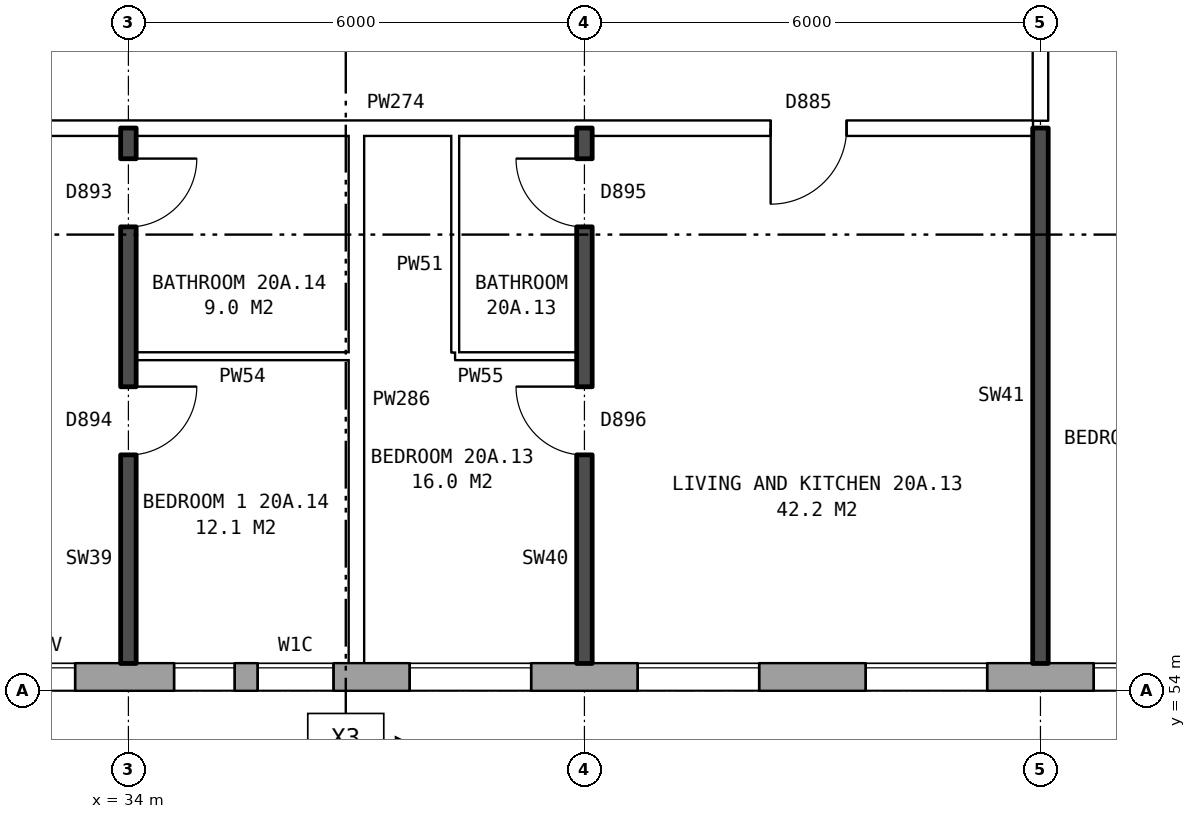
"""IFC4 building model, lengths in metres.
Left out: names, types, materials, properties, quantities, classifications, styles, units other than length and angle.
Written with IfcOpenShell. Run it as: python <this file> out.ifc"""

import sys

from ifc_helpers import new_model, si_unit, direction, frame, frame_2d, origin, place, context, subcontext, project, spatial, rectangle, extrude, element, fill, save


model = new_model("IFC4")
c1 = context("Model", 3, precision=1e-05, world=origin(), true_north=direction((0.0, 1.0)))
c2 = subcontext(c1, "Body", "Model", "MODEL_VIEW")
j1 = project(units=[si_unit("LENGTHUNIT", "METRE"), si_unit("PLANEANGLEUNIT", "RADIAN")], contexts=[c1])
p1 = place(None, origin())
s1 = spatial("IfcSite", under=j1, at=p1, CompositionType="ELEMENT")
p2 = place(p1, origin())
s2 = spatial("IfcBuilding", under=s1, at=p2, CompositionType="ELEMENT")
p3 = place(p2, frame((0.0, 0.0, 74.7)))
s3 = spatial("IfcBuildingStorey", under=s2, at=p3, CompositionType="ELEMENT", Elevation=74.7)
p4 = place(p3, frame((26.325, 54.18, 0.0), z_axis=(0.0, 0.0, 1.0), x_axis=(1.0, 0.0, 0.0)))
e1 = element("IfcWall", 1, at=p4, inside=s3, PredefinedType="STANDARD", context=c2, shape_type="SweptSolid", body=[
    extrude(rectangle(XDim=46.601, YDim=0.36, at=frame_2d((23.3, 0.0))), origin(), (0.0, 0.0, 1.0), 2.85),
])
p5 = place(p4, frame((2.375, 0.0, 0.8)))
e2 = element("IfcOpeningElement", 2, at=p5, cuts=e1, PredefinedType="OPENING", context=c2, shape_type="SweptSolid", body=[
    extrude(rectangle(XDim=1.6, YDim=1.8, at=frame_2d((0.8, 0.9))), frame((0.0, 0.19, 0.0), z_axis=(0.0, -1.0, 0.0), x_axis=(1.0, 0.0, 0.0)), (0.0, 0.0, 1.0), 0.38),
])
p6 = place(p4, frame((4.275, 0.0, 0.8)))
e3 = element("IfcOpeningElement", 3, at=p6, cuts=e1, PredefinedType="OPENING", context=c2, shape_type="SweptSolid", body=[
    extrude(rectangle(XDim=1.6, YDim=1.8, at=frame_2d((0.8, 0.9))), frame((0.0, 0.19, 0.0), z_axis=(0.0, -1.0, 0.0), x_axis=(1.0, 0.0, 0.0)), (0.0, 0.0, 1.0), 0.38),
])
p7 = place(p4, frame((8.275, 0.0, 0.8)))
e4 = element("IfcOpeningElement", 4, at=p7, cuts=e1, PredefinedType="OPENING", context=c2, shape_type="SweptSolid", body=[
    extrude(rectangle(XDim=0.8, YDim=0.9, at=frame_2d((0.4, 0.45))), frame((0.0, 0.19, 0.0), z_axis=(0.0, -1.0, 0.0), x_axis=(1.0, 0.0, 0.0)), (0.0, 0.0, 1.0), 0.38),
])
p8 = place(p4, frame((11.375, 0.0, 0.8)))
e5 = element("IfcOpeningElement", 5, at=p8, cuts=e1, PredefinedType="OPENING", context=c2, shape_type="SweptSolid", body=[
    extrude(rectangle(XDim=1.6, YDim=1.8, at=frame_2d((0.8, 0.9))), frame((0.0, 0.19, 0.0), z_axis=(0.0, -1.0, 0.0), x_axis=(1.0, 0.0, 0.0)), (0.0, 0.0, 1.0), 0.38),
])
p9 = place(p4, frame((14.375, 0.0, 0.8)))
e6 = element("IfcOpeningElement", 6, at=p9, cuts=e1, PredefinedType="OPENING", context=c2, shape_type="SweptSolid", body=[
    extrude(rectangle(XDim=1.6, YDim=1.8, at=frame_2d((0.8, 0.9))), frame((0.0, 0.19, 0.0), z_axis=(0.0, -1.0, 0.0), x_axis=(1.0, 0.0, 0.0)), (0.0, 0.0, 1.0), 0.38),
])
p10 = place(p4, frame((17.375, 0.0, 0.8)))
e7 = element("IfcOpeningElement", 7, at=p10, cuts=e1, PredefinedType="OPENING", context=c2, shape_type="SweptSolid", body=[
    extrude(rectangle(XDim=1.6, YDim=1.8, at=frame_2d((0.8, 0.9))), frame((0.0, 0.19, 0.0), z_axis=(0.0, -1.0, 0.0), x_axis=(1.0, 0.0, 0.0)), (0.0, 0.0, 1.0), 0.38),
])
p11 = place(p4, frame((20.375, 0.0, 0.8)))
e8 = element("IfcOpeningElement", 8, at=p11, cuts=e1, PredefinedType="OPENING", context=c2, shape_type="SweptSolid", body=[
    extrude(rectangle(XDim=1.6, YDim=1.8, at=frame_2d((0.8, 0.9))), frame((0.0, 0.19, 0.0), z_axis=(0.0, -1.0, 0.0), x_axis=(1.0, 0.0, 0.0)), (0.0, 0.0, 1.0), 0.38),
])
p12 = place(p4, frame((23.375, 0.0, 0.8)))
e9 = element("IfcOpeningElement", 9, at=p12, cuts=e1, PredefinedType="OPENING", context=c2, shape_type="SweptSolid", body=[
    extrude(rectangle(XDim=1.6, YDim=1.8, at=frame_2d((0.8, 0.9))), frame((0.0, 0.19, 0.0), z_axis=(0.0, -1.0, 0.0), x_axis=(1.0, 0.0, 0.0)), (0.0, 0.0, 1.0), 0.38),
])
p13 = place(p4, frame((26.375, 0.0, 0.8)))
e10 = element("IfcOpeningElement", 10, at=p13, cuts=e1, PredefinedType="OPENING", context=c2, shape_type="SweptSolid", body=[
    extrude(rectangle(XDim=1.6, YDim=1.8, at=frame_2d((0.8, 0.9))), frame((0.0, 0.19, 0.0), z_axis=(0.0, -1.0, 0.0), x_axis=(1.0, 0.0, 0.0)), (0.0, 0.0, 1.0), 0.38),
])
p14 = place(p4, frame((29.375, 0.0, 0.8)))
e11 = element("IfcOpeningElement", 11, at=p14, cuts=e1, PredefinedType="OPENING", context=c2, shape_type="SweptSolid", body=[
    extrude(rectangle(XDim=1.6, YDim=1.8, at=frame_2d((0.8, 0.9))), frame((0.0, 0.19, 0.0), z_axis=(0.0, -1.0, 0.0), x_axis=(1.0, 0.0, 0.0)), (0.0, 0.0, 1.0), 0.38),
])
p15 = place(p4, frame((32.375, 0.0, 0.8)))
e12 = element("IfcOpeningElement", 12, at=p15, cuts=e1, PredefinedType="OPENING", context=c2, shape_type="SweptSolid", body=[
    extrude(rectangle(XDim=1.6, YDim=1.8, at=frame_2d((0.8, 0.9))), frame((0.0, 0.19, 0.0), z_axis=(0.0, -1.0, 0.0), x_axis=(1.0, 0.0, 0.0)), (0.0, 0.0, 1.0), 0.38),
])
p16 = place(p4, frame((35.375, 0.0, 0.8)))
e13 = element("IfcOpeningElement", 13, at=p16, cuts=e1, PredefinedType="OPENING", context=c2, shape_type="SweptSolid", body=[
    extrude(rectangle(XDim=1.6, YDim=1.8, at=frame_2d((0.8, 0.9))), frame((0.0, 0.19, 0.0), z_axis=(0.0, -1.0, 0.0), x_axis=(1.0, 0.0, 0.0)), (0.0, 0.0, 1.0), 0.38),
])
p17 = place(p4, frame((39.625, 0.0, 1.7)))
e14 = element("IfcOpeningElement", 14, at=p17, cuts=e1, PredefinedType="OPENING", context=c2, shape_type="SweptSolid", body=[
    extrude(rectangle(XDim=1.4, YDim=0.9, at=frame_2d((0.7, 0.45))), frame((0.0, 0.19, 0.0), z_axis=(0.0, -1.0, 0.0), x_axis=(1.0, 0.0, 0.0)), (0.0, 0.0, 1.0), 0.38),
])
p18 = place(p4, frame((41.375, 0.0, 0.8)))
e15 = element("IfcOpeningElement", 15, at=p18, cuts=e1, PredefinedType="OPENING", context=c2, shape_type="SweptSolid", body=[
    extrude(rectangle(XDim=1.6, YDim=1.8, at=frame_2d((0.8, 0.9))), frame((0.0, 0.19, 0.0), z_axis=(0.0, -1.0, 0.0), x_axis=(1.0, 0.0, 0.0)), (0.0, 0.0, 1.0), 0.38),
])
p19 = place(p4, frame((44.375, 0.0, 0.8)))
e16 = element("IfcOpeningElement", 16, at=p19, cuts=e1, PredefinedType="OPENING", context=c2, shape_type="SweptSolid", body=[
    extrude(rectangle(XDim=1.6, YDim=1.8, at=frame_2d((0.8, 0.9))), frame((0.0, 0.19, 0.0), z_axis=(0.0, -1.0, 0.0), x_axis=(1.0, 0.0, 0.0)), (0.0, 0.0, 1.0), 0.38),
])
p20 = place(p4, frame((6.175, 0.0, 1.7)))
e17 = element("IfcOpeningElement", 17, at=p20, cuts=e1, PredefinedType="OPENING", context=c2, shape_type="SweptSolid", body=[
    extrude(rectangle(XDim=0.8, YDim=0.9, at=frame_2d((0.4, 0.45))), frame((0.0, 0.19, 0.0), z_axis=(0.0, -1.0, 0.0), x_axis=(1.0, 0.0, 0.0)), (0.0, 0.0, 1.0), 0.38),
])
p21 = place(p4, frame((9.375, 0.0, 0.8)))
e18 = element("IfcOpeningElement", 18, at=p21, cuts=e1, PredefinedType="OPENING", context=c2, shape_type="SweptSolid", body=[
    extrude(rectangle(XDim=1.0, YDim=1.8, at=frame_2d((0.5, 0.9))), frame((0.0, 0.19, 0.0), z_axis=(0.0, -1.0, 0.0), x_axis=(1.0, 0.0, 0.0)), (0.0, 0.0, 1.0), 0.38),
])
p22 = place(p3, frame((34.1, 58.4, 0.0), z_axis=(0.0, 0.0, 1.0), x_axis=(1.0, 0.0, 0.0)))
e19 = element("IfcWall", 19, at=p22, inside=s3, PredefinedType="PARTITIONING", context=c2, shape_type="SweptSolid", body=[
    extrude(rectangle(XDim=2.8, YDim=0.1, at=frame_2d((1.4, 0.0))), origin(), (0.0, 0.0, 1.0), 2.85),
])
p23 = place(p3, frame((38.3, 58.4, 0.0), z_axis=(0.0, 0.0, 1.0), x_axis=(1.0, 0.0, 0.0)))
e20 = element("IfcWall", 20, at=p23, inside=s3, PredefinedType="PARTITIONING", context=c2, shape_type="SweptSolid", body=[
    extrude(rectangle(XDim=1.6, YDim=0.1, at=frame_2d((0.8, 0.0))), origin(), (0.0, 0.0, 1.0), 2.85),
])
p24 = place(p3, frame((23.61, 61.4, 0.0), z_axis=(0.0, 0.0, 1.0), x_axis=(1.0, 0.0, 0.0)))
e21 = element("IfcWall", 21, at=p24, inside=s3, PredefinedType="PARTITIONING", context=c2, shape_type="SweptSolid", body=[
    extrude(rectangle(XDim=22.29, YDim=0.2, at=frame_2d((11.145, 0.0))), origin(), (0.0, 0.0, 1.0), 2.85),
])
p25 = place(p24, frame((18.84, 0.0, 0.0)))
e22 = element("IfcOpeningElement", 22, at=p25, cuts=e21, PredefinedType="OPENING", context=c2, shape_type="SweptSolid", body=[
    extrude(rectangle(XDim=1.0, YDim=2.1, at=frame_2d((0.5, 1.05))), frame((0.0, 0.11, 0.0), z_axis=(0.0, -1.0, 0.0), x_axis=(1.0, 0.0, 0.0)), (0.0, 0.0, 1.0), 0.22),
])
p26 = place(p24, frame((6.89, 0.0, 0.0)))
e23 = element("IfcOpeningElement", 23, at=p26, cuts=e21, PredefinedType="OPENING", context=c2, shape_type="SweptSolid", body=[
    extrude(rectangle(XDim=1.0, YDim=2.1, at=frame_2d((0.5, 1.05))), frame((0.0, 0.11, 0.0), z_axis=(0.0, -1.0, 0.0), x_axis=(1.0, 0.0, 0.0)), (0.0, 0.0, 1.0), 0.22),
])
p27 = place(p3, frame((34.0, 54.36, 0.0), z_axis=(0.0, 0.0, 1.0), x_axis=(0.0, 1.0, 0.0)))
e24 = element("IfcWall", 24, at=p27, inside=s3, PredefinedType="SOLIDWALL", context=c2, shape_type="SweptSolid", body=[
    extrude(rectangle(XDim=7.04, YDim=0.2, at=frame_2d((3.52, 0.0))), origin(), (0.0, 0.0, 1.0), 2.85),
])
p28 = place(p27, frame((2.74, 0.0, 0.0)))
e25 = element("IfcOpeningElement", 25, at=p28, cuts=e24, PredefinedType="OPENING", context=c2, shape_type="SweptSolid", body=[
    extrude(rectangle(XDim=0.9, YDim=2.1, at=frame_2d((0.45, 1.05))), frame((0.0, 0.11, 0.0), z_axis=(0.0, -1.0, 0.0), x_axis=(1.0, 0.0, 0.0)), (0.0, 0.0, 1.0), 0.22),
])
p29 = place(p27, frame((5.74, 0.0, 0.0)))
e26 = element("IfcOpeningElement", 26, at=p29, cuts=e24, PredefinedType="OPENING", context=c2, shape_type="SweptSolid", body=[
    extrude(rectangle(XDim=0.9, YDim=2.1, at=frame_2d((0.45, 1.05))), frame((0.0, 0.11, 0.0), z_axis=(0.0, -1.0, 0.0), x_axis=(1.0, 0.0, 0.0)), (0.0, 0.0, 1.0), 0.22),
])
p30 = place(p3, frame((37.0, 54.36, 0.0), z_axis=(0.0, 0.0, 1.0), x_axis=(0.0, 1.0, 0.0)))
e27 = element("IfcWall", 27, at=p30, inside=s3, PredefinedType="PARTITIONING", context=c2, shape_type="SweptSolid", body=[
    extrude(rectangle(XDim=6.94, YDim=0.2, at=frame_2d((3.47, 0.0))), origin(), (0.0, 0.0, 1.0), 2.85),
])
p31 = place(p3, frame((38.3, 58.45, 0.0), z_axis=(0.0, 0.0, 1.0), x_axis=(0.0, 1.0, 0.0)))
e28 = element("IfcWall", 28, at=p31, inside=s3, PredefinedType="PARTITIONING", context=c2, shape_type="SweptSolid", body=[
    extrude(rectangle(XDim=2.85, YDim=0.1, at=frame_2d((1.425, 0.0))), origin(), (0.0, 0.0, 1.0), 2.85),
])
p32 = place(p3, frame((40.0, 54.36, 0.0), z_axis=(0.0, 0.0, 1.0), x_axis=(0.0, 1.0, 0.0)))
e29 = element("IfcWall", 29, at=p32, inside=s3, PredefinedType="SOLIDWALL", context=c2, shape_type="SweptSolid", body=[
    extrude(rectangle(XDim=7.04, YDim=0.2, at=frame_2d((3.52, 0.0))), origin(), (0.0, 0.0, 1.0), 2.85),
])
p33 = place(p32, frame((2.74, 0.0, 0.0)))
e30 = element("IfcOpeningElement", 30, at=p33, cuts=e29, PredefinedType="OPENING", context=c2, shape_type="SweptSolid", body=[
    extrude(rectangle(XDim=0.9, YDim=2.1, at=frame_2d((0.45, 1.05))), frame((0.0, 0.11, 0.0), z_axis=(0.0, -1.0, 0.0), x_axis=(1.0, 0.0, 0.0)), (0.0, 0.0, 1.0), 0.22),
])
p34 = place(p32, frame((5.74, 0.0, 0.0)))
e31 = element("IfcOpeningElement", 31, at=p34, cuts=e29, PredefinedType="OPENING", context=c2, shape_type="SweptSolid", body=[
    extrude(rectangle(XDim=0.9, YDim=2.1, at=frame_2d((0.45, 1.05))), frame((0.0, 0.11, 0.0), z_axis=(0.0, -1.0, 0.0), x_axis=(1.0, 0.0, 0.0)), (0.0, 0.0, 1.0), 0.22),
])
p35 = place(p3, frame((46.0, 54.36, 0.0), z_axis=(0.0, 0.0, 1.0), x_axis=(0.0, 1.0, 0.0)))
e32 = element("IfcWall", 32, at=p35, inside=s3, PredefinedType="SOLIDWALL", context=c2, shape_type="SweptSolid", body=[
    extrude(rectangle(XDim=7.04, YDim=0.2, at=frame_2d((3.52, 0.0))), origin(), (0.0, 0.0, 1.0), 2.85),
])
p36 = place(p3, frame((46.0, 61.5, 0.0), z_axis=(0.0, 0.0, 1.0), x_axis=(0.0, 1.0, 0.0)))
e33 = element("IfcWall", 33, at=p36, inside=s3, PredefinedType="PARTITIONING", context=c2, shape_type="SweptSolid", body=[
    extrude(rectangle(XDim=2.2, YDim=0.2, at=frame_2d((1.1, 0.0))), origin(), (0.0, 0.0, 1.0), 2.85),
])
p37 = place(p7, origin())
e34 = element("IfcWindow", 34, at=p37, inside=s3, PartitioningType="SINGLE_PANEL", PredefinedType="WINDOW", context=c2, shape_type="SweptSolid", body=[
    extrude(rectangle(XDim=0.8, YDim=0.9, at=frame_2d((0.4, 0.45))), frame((0.0, 0.15, 0.0), z_axis=(0.0, -1.0, 0.0), x_axis=(1.0, 0.0, 0.0)), (0.0, 0.0, 1.0), 0.06),
])
fill(e4, e34)
p38 = place(p8, origin())
e35 = element("IfcWindow", 35, at=p38, inside=s3, PartitioningType="SINGLE_PANEL", PredefinedType="WINDOW", context=c2, shape_type="SweptSolid", body=[
    extrude(rectangle(XDim=1.6, YDim=1.8, at=frame_2d((0.8, 0.9))), frame((0.0, 0.15, 0.0), z_axis=(0.0, -1.0, 0.0), x_axis=(1.0, 0.0, 0.0)), (0.0, 0.0, 1.0), 0.06),
])
fill(e5, e35)
p39 = place(p9, origin())
e36 = element("IfcWindow", 36, at=p39, inside=s3, PartitioningType="SINGLE_PANEL", PredefinedType="WINDOW", context=c2, shape_type="SweptSolid", body=[
    extrude(rectangle(XDim=1.6, YDim=1.8, at=frame_2d((0.8, 0.9))), frame((0.0, 0.15, 0.0), z_axis=(0.0, -1.0, 0.0), x_axis=(1.0, 0.0, 0.0)), (0.0, 0.0, 1.0), 0.06),
])
fill(e6, e36)
p40 = place(p10, origin())
e37 = element("IfcWindow", 37, at=p40, inside=s3, PartitioningType="SINGLE_PANEL", PredefinedType="WINDOW", context=c2, shape_type="SweptSolid", body=[
    extrude(rectangle(XDim=1.6, YDim=1.8, at=frame_2d((0.8, 0.9))), frame((0.0, 0.15, 0.0), z_axis=(0.0, -1.0, 0.0), x_axis=(1.0, 0.0, 0.0)), (0.0, 0.0, 1.0), 0.06),
])
fill(e7, e37)
p41 = place(p11, origin())
e38 = element("IfcWindow", 38, at=p41, inside=s3, PartitioningType="SINGLE_PANEL", PredefinedType="WINDOW", context=c2, shape_type="SweptSolid", body=[
    extrude(rectangle(XDim=1.6, YDim=1.8, at=frame_2d((0.8, 0.9))), frame((0.0, 0.15, 0.0), z_axis=(0.0, -1.0, 0.0), x_axis=(1.0, 0.0, 0.0)), (0.0, 0.0, 1.0), 0.06),
])
fill(e8, e38)
p42 = place(p33, origin())
e39 = element("IfcDoor", 39, at=p42, inside=s3, OperationType="SINGLE_SWING_RIGHT", PredefinedType="DOOR", context=c2, shape_type="SweptSolid", body=[
    extrude(rectangle(XDim=0.9, YDim=2.1, at=frame_2d((0.45, 1.05))), frame((0.0, 0.025, 0.0), z_axis=(0.0, -1.0, 0.0), x_axis=(1.0, 0.0, 0.0)), (0.0, 0.0, 1.0), 0.05),
])
fill(e30, e39)
p43 = place(p25, frame((1.0, 0.0, 0.0), z_axis=(0.0, 0.0, 1.0), x_axis=(-1.0, 0.0, 0.0)))
e40 = element("IfcDoor", 40, at=p43, inside=s3, OperationType="SINGLE_SWING_RIGHT", PredefinedType="DOOR", context=c2, shape_type="SweptSolid", body=[
    extrude(rectangle(XDim=1.0, YDim=2.1, at=frame_2d((0.5, 1.05))), frame((0.0, 0.025, 0.0), z_axis=(0.0, -1.0, 0.0), x_axis=(1.0, 0.0, 0.0)), (0.0, 0.0, 1.0), 0.05),
])
fill(e22, e40)
p44 = place(p34, origin())
e41 = element("IfcDoor", 41, at=p44, inside=s3, OperationType="SINGLE_SWING_RIGHT", PredefinedType="DOOR", context=c2, shape_type="SweptSolid", body=[
    extrude(rectangle(XDim=0.9, YDim=2.1, at=frame_2d((0.45, 1.05))), frame((0.0, 0.025, 0.0), z_axis=(0.0, -1.0, 0.0), x_axis=(1.0, 0.0, 0.0)), (0.0, 0.0, 1.0), 0.05),
])
fill(e31, e41)
p45 = place(p28, frame((0.9, 0.0, 0.0), z_axis=(0.0, 0.0, 1.0), x_axis=(-1.0, 0.0, 0.0)))
e42 = element("IfcDoor", 42, at=p45, inside=s3, OperationType="SINGLE_SWING_LEFT", PredefinedType="DOOR", context=c2, shape_type="SweptSolid", body=[
    extrude(rectangle(XDim=0.9, YDim=2.1, at=frame_2d((0.45, 1.05))), frame((0.0, 0.025, 0.0), z_axis=(0.0, -1.0, 0.0), x_axis=(1.0, 0.0, 0.0)), (0.0, 0.0, 1.0), 0.05),
])
fill(e25, e42)
p46 = place(p29, frame((0.9, 0.0, 0.0), z_axis=(0.0, 0.0, 1.0), x_axis=(-1.0, 0.0, 0.0)))
e43 = element("IfcDoor", 43, at=p46, inside=s3, OperationType="SINGLE_SWING_LEFT", PredefinedType="DOOR", context=c2, shape_type="SweptSolid", body=[
    extrude(rectangle(XDim=0.9, YDim=2.1, at=frame_2d((0.45, 1.05))), frame((0.0, 0.025, 0.0), z_axis=(0.0, -1.0, 0.0), x_axis=(1.0, 0.0, 0.0)), (0.0, 0.0, 1.0), 0.05),
])
fill(e26, e43)
p47 = place(p20, origin())
e44 = element("IfcWindow", 44, at=p47, inside=s3, PartitioningType="SINGLE_PANEL", PredefinedType="WINDOW", context=c2, shape_type="SweptSolid", body=[
    extrude(rectangle(XDim=0.8, YDim=0.9, at=frame_2d((0.4, 0.45))), frame((0.0, 0.15, 0.0), z_axis=(0.0, -1.0, 0.0), x_axis=(1.0, 0.0, 0.0)), (0.0, 0.0, 1.0), 0.06),
])
fill(e17, e44)
p48 = place(p21, origin())
e45 = element("IfcWindow", 45, at=p48, inside=s3, PartitioningType="SINGLE_PANEL", PredefinedType="WINDOW", context=c2, shape_type="SweptSolid", body=[
    extrude(rectangle(XDim=1.0, YDim=1.8, at=frame_2d((0.5, 0.9))), frame((0.0, 0.15, 0.0), z_axis=(0.0, -1.0, 0.0), x_axis=(1.0, 0.0, 0.0)), (0.0, 0.0, 1.0), 0.06),
])
fill(e18, e45)
save(model, sys.argv[1])
